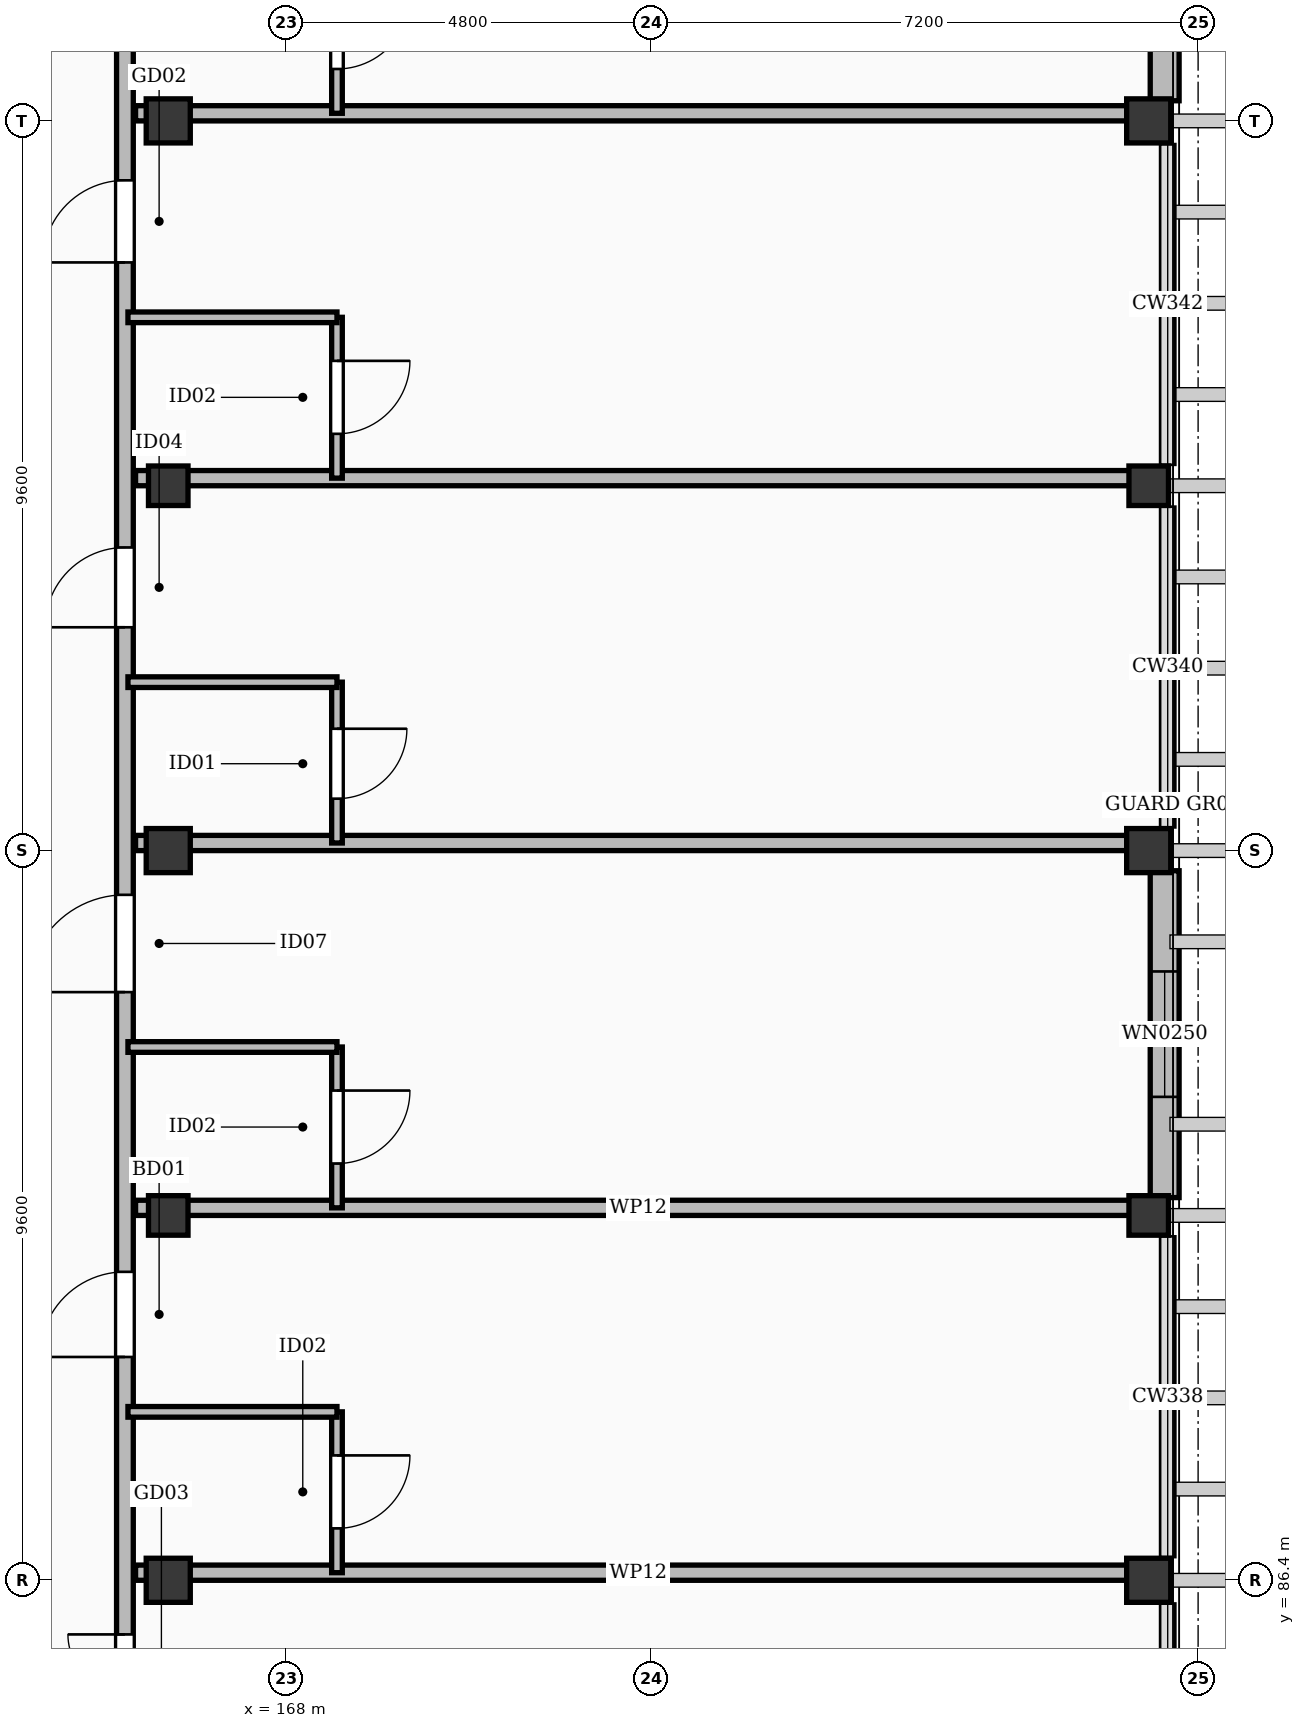
"""IFC4 building model, lengths in metres.
Left out: names, types, materials, properties, quantities, classifications, styles, units other than length and angle.
Written with IfcOpenShell. Run it as: python <this file> out.ifc"""

import sys

from ifc_helpers import new_model, si_unit, direction, frame, frame_2d, origin, origin_2d, place, context, subcontext, project, spatial, rectangle, extrude, element, fill, save


model = new_model("IFC4")
c1 = context("Model", 3, precision=1e-05, world=origin(), true_north=direction((0.0, 1.0)))
c2 = subcontext(c1, "Body", "Model", "MODEL_VIEW")
j1 = project(units=[si_unit("LENGTHUNIT", "METRE"), si_unit("PLANEANGLEUNIT", "RADIAN")], contexts=[c1])
p1 = place(None, origin())
s1 = spatial("IfcSite", under=j1, at=p1, CompositionType="ELEMENT")
p2 = place(p1, origin())
s2 = spatial("IfcBuilding", under=s1, at=p2, CompositionType="ELEMENT")
p3 = place(p2, frame((0.0, 0.0, 46.5)))
s3 = spatial("IfcBuildingStorey", under=s2, at=p3, CompositionType="ELEMENT", Elevation=46.5)
for number, where, z_axis, x_axis in (
    (1, (166.45, 86.4, 0.0), (0.0, 0.0, 1.0), (1.0, 0.0, 0.0)),
    (2, (166.45, 96.0, 0.0), (0.0, 0.0, 1.0), (1.0, 0.0, 0.0)),
    (3, (166.45, 105.6, 0.0), (0.0, 0.0, 1.0), (1.0, 0.0, 0.0)),
    (4, (179.35, 86.4, 0.0), (0.0, 0.0, 1.0), (1.0, 0.0, 0.0)),
    (5, (179.35, 96.0, 0.0), (0.0, 0.0, 1.0), (1.0, 0.0, 0.0)),
    (6, (179.35, 105.6, 0.0), (0.0, 0.0, 1.0), (1.0, 0.0, 0.0)),
):
    element("IfcColumn", number, at=place(p3, frame(where, z_axis=z_axis, x_axis=x_axis)), inside=s3, PredefinedType="COLUMN", context=c2, shape_type="SweptSolid", body=[
        extrude(rectangle(XDim=0.58, YDim=0.58, at=origin_2d()), origin(), (0.0, 0.0, 1.0), 3.9),
    ])
for number, where, z_axis, x_axis in (
    (7, (166.45, 91.2, 0.0), (0.0, 0.0, 1.0), (1.0, 0.0, 0.0)),
    (8, (166.45, 100.8, 0.0), (0.0, 0.0, 1.0), (1.0, 0.0, 0.0)),
    (9, (179.35, 91.2, 0.0), (0.0, 0.0, 1.0), (1.0, 0.0, 0.0)),
    (10, (179.35, 100.8, 0.0), (0.0, 0.0, 1.0), (1.0, 0.0, 0.0)),
):
    element("IfcColumn", number, at=place(p3, frame(where, z_axis=z_axis, x_axis=x_axis)), inside=s3, PredefinedType="COLUMN", context=c2, shape_type="SweptSolid", body=[
        extrude(rectangle(XDim=0.52, YDim=0.52, at=origin_2d()), origin(), (0.0, 0.0, 1.0), 3.9),
    ])
p4 = place(p3, frame((179.56, 95.735, 0.0), z_axis=(0.0, 0.0, 1.0), x_axis=(0.0, -1.0, 0.0)))
e11 = element("IfcWall", 11, at=p4, inside=s3, PredefinedType="SOLIDWALL", context=c2, shape_type="SweptSolid", body=[
    extrude(rectangle(XDim=4.3, YDim=0.38, at=frame_2d((2.15, 0.0))), origin(), (0.0, 0.0, 1.0), 3.072),
])
p5 = place(p4, frame((1.325, 0.0, 0.55)))
e12 = element("IfcOpeningElement", 12, at=p5, cuts=e11, PredefinedType="OPENING", context=c2, shape_type="SweptSolid", body=[
    extrude(rectangle(XDim=1.65, YDim=1.75, at=frame_2d((0.825, 0.875))), frame((0.0, 0.202, 0.0), z_axis=(0.0, -1.0, 0.0), x_axis=(1.0, 0.0, 0.0)), (0.0, 0.0, 1.0), 0.404),
])
p6 = place(p3, frame((179.56, 110.165, 0.0), z_axis=(0.0, 0.0, 1.0), x_axis=(0.0, -1.0, 0.0)))
e13 = element("IfcWall", 13, at=p6, inside=s3, PredefinedType="SOLIDWALL", context=c2, shape_type="SweptSolid", body=[
    extrude(rectangle(XDim=4.3, YDim=0.38, at=frame_2d((2.15, 0.0))), origin(), (0.0, 0.0, 1.0), 3.072),
])
p7 = place(p6, frame((1.1, 0.0, 0.55)))
e14 = element("IfcOpeningElement", 14, at=p7, cuts=e13, PredefinedType="OPENING", context=c2, shape_type="SweptSolid", body=[
    extrude(rectangle(XDim=2.1, YDim=1.78, at=frame_2d((1.05, 0.89))), frame((0.0, 0.202, 0.0), z_axis=(0.0, -1.0, 0.0), x_axis=(1.0, 0.0, 0.0)), (0.0, 0.0, 1.0), 0.404),
])
p8 = place(p3, frame((165.88, 67.55, 0.0), z_axis=(0.0, 0.0, 1.0), x_axis=(0.0, 1.0, 0.0)))
e15 = element("IfcWall", 15, at=p8, inside=s3, PredefinedType="PARTITIONING", context=c2, shape_type="SweptSolid", body=[
    extrude(rectangle(XDim=58.1, YDim=0.22, at=frame_2d((29.05, 0.0))), origin(), (0.0, 0.0, 1.0), 2.922),
])
p9 = place(p8, frame((5.15, 0.0, 0.0)))
e16 = element("IfcOpeningElement", 16, at=p9, cuts=e15, PredefinedType="OPENING", context=c2, shape_type="SweptSolid", body=[
    extrude(rectangle(XDim=1.28, YDim=2.16, at=frame_2d((0.64, 1.08))), frame((0.0, 0.122, 0.0), z_axis=(0.0, -1.0, 0.0), x_axis=(1.0, 0.0, 0.0)), (0.0, 0.0, 1.0), 0.244),
])
p10 = place(p8, frame((12.188, 0.0, 0.0)))
e17 = element("IfcOpeningElement", 17, at=p10, cuts=e15, PredefinedType="OPENING", context=c2, shape_type="SweptSolid", body=[
    extrude(rectangle(XDim=1.02, YDim=2.2, at=frame_2d((0.51, 1.1))), frame((0.0, 0.122, 0.0), z_axis=(0.0, -1.0, 0.0), x_axis=(1.0, 0.0, 0.0)), (0.0, 0.0, 1.0), 0.244),
])
p11 = place(p8, frame((16.638, 0.0, 0.0)))
e18 = element("IfcOpeningElement", 18, at=p11, cuts=e15, PredefinedType="OPENING", context=c2, shape_type="SweptSolid", body=[
    extrude(rectangle(XDim=1.5, YDim=2.3, at=frame_2d((0.75, 1.15))), frame((0.0, 0.122, 0.0), z_axis=(0.0, -1.0, 0.0), x_axis=(1.0, 0.0, 0.0)), (0.0, 0.0, 1.0), 0.244),
])
p12 = place(p8, frame((21.788, 0.0, 0.0)))
e19 = element("IfcOpeningElement", 19, at=p12, cuts=e15, PredefinedType="OPENING", context=c2, shape_type="SweptSolid", body=[
    extrude(rectangle(XDim=1.12, YDim=2.15, at=frame_2d((0.56, 1.075))), frame((0.0, 0.122, 0.0), z_axis=(0.0, -1.0, 0.0), x_axis=(1.0, 0.0, 0.0)), (0.0, 0.0, 1.0), 0.244),
])
p13 = place(p8, frame((26.588, 0.0, 0.0)))
e20 = element("IfcOpeningElement", 20, at=p13, cuts=e15, PredefinedType="OPENING", context=c2, shape_type="SweptSolid", body=[
    extrude(rectangle(XDim=1.28, YDim=2.16, at=frame_2d((0.64, 1.08))), frame((0.0, 0.122, 0.0), z_axis=(0.0, -1.0, 0.0), x_axis=(1.0, 0.0, 0.0)), (0.0, 0.0, 1.0), 0.244),
])
p14 = place(p8, frame((31.388, 0.0, 0.0)))
e21 = element("IfcOpeningElement", 21, at=p14, cuts=e15, PredefinedType="OPENING", context=c2, shape_type="SweptSolid", body=[
    extrude(rectangle(XDim=1.05, YDim=2.18, at=frame_2d((0.525, 1.09))), frame((0.0, 0.122, 0.0), z_axis=(0.0, -1.0, 0.0), x_axis=(1.0, 0.0, 0.0)), (0.0, 0.0, 1.0), 0.244),
])
p15 = place(p8, frame((36.188, 0.0, 0.0)))
e22 = element("IfcOpeningElement", 22, at=p15, cuts=e15, PredefinedType="OPENING", context=c2, shape_type="SweptSolid", body=[
    extrude(rectangle(XDim=1.08, YDim=2.25, at=frame_2d((0.54, 1.125))), frame((0.0, 0.122, 0.0), z_axis=(0.0, -1.0, 0.0), x_axis=(1.0, 0.0, 0.0)), (0.0, 0.0, 1.0), 0.244),
])
p16 = place(p8, frame((40.988, 0.0, 0.0)))
e23 = element("IfcOpeningElement", 23, at=p16, cuts=e15, PredefinedType="OPENING", context=c2, shape_type="SweptSolid", body=[
    extrude(rectangle(XDim=1.02, YDim=2.2, at=frame_2d((0.51, 1.1))), frame((0.0, 0.122, 0.0), z_axis=(0.0, -1.0, 0.0), x_axis=(1.0, 0.0, 0.0)), (0.0, 0.0, 1.0), 0.244),
])
p17 = place(p8, frame((45.438, 0.0, 0.0)))
e24 = element("IfcOpeningElement", 24, at=p17, cuts=e15, PredefinedType="OPENING", context=c2, shape_type="SweptSolid", body=[
    extrude(rectangle(XDim=1.5, YDim=2.3, at=frame_2d((0.75, 1.15))), frame((0.0, 0.122, 0.0), z_axis=(0.0, -1.0, 0.0), x_axis=(1.0, 0.0, 0.0)), (0.0, 0.0, 1.0), 0.244),
])
p18 = place(p8, frame((50.588, 0.0, 0.0)))
e25 = element("IfcOpeningElement", 25, at=p18, cuts=e15, PredefinedType="OPENING", context=c2, shape_type="SweptSolid", body=[
    extrude(rectangle(XDim=1.12, YDim=2.15, at=frame_2d((0.56, 1.075))), frame((0.0, 0.122, 0.0), z_axis=(0.0, -1.0, 0.0), x_axis=(1.0, 0.0, 0.0)), (0.0, 0.0, 1.0), 0.244),
])
p19 = place(p8, frame((55.388, 0.0, 0.0)))
e26 = element("IfcOpeningElement", 26, at=p19, cuts=e15, PredefinedType="OPENING", context=c2, shape_type="SweptSolid", body=[
    extrude(rectangle(XDim=1.28, YDim=2.16, at=frame_2d((0.64, 1.08))), frame((0.0, 0.122, 0.0), z_axis=(0.0, -1.0, 0.0), x_axis=(1.0, 0.0, 0.0)), (0.0, 0.0, 1.0), 0.244),
])
p20 = place(p3, frame((166.02, 86.5, 0.0), z_axis=(0.0, 0.0, 1.0), x_axis=(1.0, 0.0, 0.0)))
e27 = element("IfcWall", 27, at=p20, inside=s3, PredefinedType="PARTITIONING", context=c2, shape_type="SweptSolid", body=[
    extrude(rectangle(XDim=13.23, YDim=0.2, at=frame_2d((6.615, 0.0))), origin(), (0.0, 0.0, 1.0), 3.072),
])
p21 = place(p3, frame((168.67, 86.5, 0.0), z_axis=(0.0, 0.0, 1.0), x_axis=(0.0, 1.0, 0.0)))
e28 = element("IfcWall", 28, at=p21, inside=s3, PredefinedType="PARTITIONING", context=c2, shape_type="SweptSolid", body=[
    extrude(rectangle(XDim=2.116, YDim=0.14, at=frame_2d((1.058, 0.0))), origin(), (0.0, 0.0, 1.0), 3.072),
])
p22 = place(p21, frame((0.583, 0.0, 0.0)))
e29 = element("IfcOpeningElement", 29, at=p22, cuts=e28, PredefinedType="OPENING", context=c2, shape_type="SweptSolid", body=[
    extrude(rectangle(XDim=0.96, YDim=2.12, at=frame_2d((0.48, 1.06))), frame((0.0, 0.082, 0.0), z_axis=(0.0, -1.0, 0.0), x_axis=(1.0, 0.0, 0.0)), (0.0, 0.0, 1.0), 0.164),
])
p23 = place(p3, frame((165.92, 88.616, 0.0), z_axis=(0.0, 0.0, 1.0), x_axis=(1.0, 0.0, 0.0)))
e30 = element("IfcWall", 30, at=p23, inside=s3, PredefinedType="PARTITIONING", context=c2, shape_type="SweptSolid", body=[
    extrude(rectangle(XDim=2.75, YDim=0.14, at=frame_2d((1.375, 0.0))), origin(), (0.0, 0.0, 1.0), 3.072),
])
p24 = place(p3, frame((166.02, 91.3, 0.0), z_axis=(0.0, 0.0, 1.0), x_axis=(1.0, 0.0, 0.0)))
e31 = element("IfcWall", 31, at=p24, inside=s3, PredefinedType="PARTITIONING", context=c2, shape_type="SweptSolid", body=[
    extrude(rectangle(XDim=13.23, YDim=0.2, at=frame_2d((6.615, 0.0))), origin(), (0.0, 0.0, 1.0), 3.072),
])
p25 = place(p3, frame((168.67, 91.3, 0.0), z_axis=(0.0, 0.0, 1.0), x_axis=(0.0, 1.0, 0.0)))
e32 = element("IfcWall", 32, at=p25, inside=s3, PredefinedType="PARTITIONING", context=c2, shape_type="SweptSolid", body=[
    extrude(rectangle(XDim=2.116, YDim=0.14, at=frame_2d((1.058, 0.0))), origin(), (0.0, 0.0, 1.0), 3.072),
])
p26 = place(p25, frame((0.583, 0.0, 0.0)))
e33 = element("IfcOpeningElement", 33, at=p26, cuts=e32, PredefinedType="OPENING", context=c2, shape_type="SweptSolid", body=[
    extrude(rectangle(XDim=0.96, YDim=2.12, at=frame_2d((0.48, 1.06))), frame((0.0, 0.082, 0.0), z_axis=(0.0, -1.0, 0.0), x_axis=(1.0, 0.0, 0.0)), (0.0, 0.0, 1.0), 0.164),
])
p27 = place(p3, frame((165.92, 93.416, 0.0), z_axis=(0.0, 0.0, 1.0), x_axis=(1.0, 0.0, 0.0)))
e34 = element("IfcWall", 34, at=p27, inside=s3, PredefinedType="PARTITIONING", context=c2, shape_type="SweptSolid", body=[
    extrude(rectangle(XDim=2.75, YDim=0.14, at=frame_2d((1.375, 0.0))), origin(), (0.0, 0.0, 1.0), 3.072),
])
p28 = place(p3, frame((166.02, 96.1, 0.0), z_axis=(0.0, 0.0, 1.0), x_axis=(1.0, 0.0, 0.0)))
e35 = element("IfcWall", 35, at=p28, inside=s3, PredefinedType="PARTITIONING", context=c2, shape_type="SweptSolid", body=[
    extrude(rectangle(XDim=13.23, YDim=0.2, at=frame_2d((6.615, 0.0))), origin(), (0.0, 0.0, 1.0), 3.072),
])
p29 = place(p3, frame((168.67, 96.1, 0.0), z_axis=(0.0, 0.0, 1.0), x_axis=(0.0, 1.0, 0.0)))
e36 = element("IfcWall", 36, at=p29, inside=s3, PredefinedType="PARTITIONING", context=c2, shape_type="SweptSolid", body=[
    extrude(rectangle(XDim=2.116, YDim=0.14, at=frame_2d((1.058, 0.0))), origin(), (0.0, 0.0, 1.0), 3.072),
])
p30 = place(p29, frame((0.583, 0.0, 0.0)))
e37 = element("IfcOpeningElement", 37, at=p30, cuts=e36, PredefinedType="OPENING", context=c2, shape_type="SweptSolid", body=[
    extrude(rectangle(XDim=0.92, YDim=2.1, at=frame_2d((0.46, 1.05))), frame((0.0, 0.082, 0.0), z_axis=(0.0, -1.0, 0.0), x_axis=(1.0, 0.0, 0.0)), (0.0, 0.0, 1.0), 0.164),
])
p31 = place(p3, frame((165.92, 98.216, 0.0), z_axis=(0.0, 0.0, 1.0), x_axis=(1.0, 0.0, 0.0)))
e38 = element("IfcWall", 38, at=p31, inside=s3, PredefinedType="PARTITIONING", context=c2, shape_type="SweptSolid", body=[
    extrude(rectangle(XDim=2.75, YDim=0.14, at=frame_2d((1.375, 0.0))), origin(), (0.0, 0.0, 1.0), 3.072),
])
p32 = place(p3, frame((166.02, 100.9, 0.0), z_axis=(0.0, 0.0, 1.0), x_axis=(1.0, 0.0, 0.0)))
e39 = element("IfcWall", 39, at=p32, inside=s3, PredefinedType="PARTITIONING", context=c2, shape_type="SweptSolid", body=[
    extrude(rectangle(XDim=13.23, YDim=0.2, at=frame_2d((6.615, 0.0))), origin(), (0.0, 0.0, 1.0), 3.072),
])
p33 = place(p3, frame((168.67, 100.9, 0.0), z_axis=(0.0, 0.0, 1.0), x_axis=(0.0, 1.0, 0.0)))
e40 = element("IfcWall", 40, at=p33, inside=s3, PredefinedType="PARTITIONING", context=c2, shape_type="SweptSolid", body=[
    extrude(rectangle(XDim=2.116, YDim=0.14, at=frame_2d((1.058, 0.0))), origin(), (0.0, 0.0, 1.0), 3.072),
])
p34 = place(p33, frame((0.583, 0.0, 0.0)))
e41 = element("IfcOpeningElement", 41, at=p34, cuts=e40, PredefinedType="OPENING", context=c2, shape_type="SweptSolid", body=[
    extrude(rectangle(XDim=0.96, YDim=2.12, at=frame_2d((0.48, 1.06))), frame((0.0, 0.082, 0.0), z_axis=(0.0, -1.0, 0.0), x_axis=(1.0, 0.0, 0.0)), (0.0, 0.0, 1.0), 0.164),
])
p35 = place(p3, frame((165.92, 103.016, 0.0), z_axis=(0.0, 0.0, 1.0), x_axis=(1.0, 0.0, 0.0)))
e42 = element("IfcWall", 42, at=p35, inside=s3, PredefinedType="PARTITIONING", context=c2, shape_type="SweptSolid", body=[
    extrude(rectangle(XDim=2.75, YDim=0.14, at=frame_2d((1.375, 0.0))), origin(), (0.0, 0.0, 1.0), 3.072),
])
p36 = place(p3, frame((166.02, 105.7, 0.0), z_axis=(0.0, 0.0, 1.0), x_axis=(1.0, 0.0, 0.0)))
e43 = element("IfcWall", 43, at=p36, inside=s3, PredefinedType="PARTITIONING", context=c2, shape_type="SweptSolid", body=[
    extrude(rectangle(XDim=13.23, YDim=0.2, at=frame_2d((6.615, 0.0))), origin(), (0.0, 0.0, 1.0), 3.072),
])
p37 = place(p3, frame((168.67, 105.7, 0.0), z_axis=(0.0, 0.0, 1.0), x_axis=(0.0, 1.0, 0.0)))
e44 = element("IfcWall", 44, at=p37, inside=s3, PredefinedType="PARTITIONING", context=c2, shape_type="SweptSolid", body=[
    extrude(rectangle(XDim=2.116, YDim=0.14, at=frame_2d((1.058, 0.0))), origin(), (0.0, 0.0, 1.0), 3.072),
])
p38 = place(p37, frame((0.583, 0.0, 0.0)))
e45 = element("IfcOpeningElement", 45, at=p38, cuts=e44, PredefinedType="OPENING", context=c2, shape_type="SweptSolid", body=[
    extrude(rectangle(XDim=0.96, YDim=2.12, at=frame_2d((0.48, 1.06))), frame((0.0, 0.082, 0.0), z_axis=(0.0, -1.0, 0.0), x_axis=(1.0, 0.0, 0.0)), (0.0, 0.0, 1.0), 0.164),
])
p39 = place(p5, origin())
e46 = element("IfcWindow", 46, at=p39, inside=s3, PartitioningType="SINGLE_PANEL", PredefinedType="WINDOW", context=c2, shape_type="SweptSolid", body=[
    extrude(rectangle(XDim=1.65, YDim=1.75, at=frame_2d((0.825, 0.875))), frame((0.0, 0.03, 0.0), z_axis=(0.0, -1.0, 0.0), x_axis=(1.0, 0.0, 0.0)), (0.0, 0.0, 1.0), 0.06),
])
fill(e12, e46)
p40 = place(p11, origin())
e47 = element("IfcDoor", 47, at=p40, inside=s3, OperationType="DOUBLE_DOOR_SINGLE_SWING", PredefinedType="DOOR", context=c2, shape_type="SweptSolid", body=[
    extrude(rectangle(XDim=1.5, YDim=2.3, at=frame_2d((0.75, 1.15))), frame((0.0, 0.025, 0.0), z_axis=(0.0, -1.0, 0.0), x_axis=(1.0, 0.0, 0.0)), (0.0, 0.0, 1.0), 0.05),
])
fill(e18, e47)
p41 = place(p12, origin())
e48 = element("IfcDoor", 48, at=p41, inside=s3, OperationType="SINGLE_SWING_LEFT", PredefinedType="DOOR", context=c2, shape_type="SweptSolid", body=[
    extrude(rectangle(XDim=1.12, YDim=2.15, at=frame_2d((0.56, 1.075))), frame((0.0, 0.025, 0.0), z_axis=(0.0, -1.0, 0.0), x_axis=(1.0, 0.0, 0.0)), (0.0, 0.0, 1.0), 0.05),
])
fill(e19, e48)
p42 = place(p22, frame((0.96, 0.0, 0.0), z_axis=(0.0, 0.0, 1.0), x_axis=(-1.0, 0.0, 0.0)))
e49 = element("IfcDoor", 49, at=p42, inside=s3, OperationType="SINGLE_SWING_RIGHT", PredefinedType="DOOR", context=c2, shape_type="SweptSolid", body=[
    extrude(rectangle(XDim=0.96, YDim=2.12, at=frame_2d((0.48, 1.06))), frame((0.0, 0.025, 0.0), z_axis=(0.0, -1.0, 0.0), x_axis=(1.0, 0.0, 0.0)), (0.0, 0.0, 1.0), 0.05),
])
fill(e29, e49)
p43 = place(p13, origin())
e50 = element("IfcDoor", 50, at=p43, inside=s3, OperationType="SINGLE_SWING_LEFT", PredefinedType="DOOR", context=c2, shape_type="SweptSolid", body=[
    extrude(rectangle(XDim=1.28, YDim=2.16, at=frame_2d((0.64, 1.08))), frame((0.0, 0.025, 0.0), z_axis=(0.0, -1.0, 0.0), x_axis=(1.0, 0.0, 0.0)), (0.0, 0.0, 1.0), 0.05),
])
fill(e20, e50)
p44 = place(p26, frame((0.96, 0.0, 0.0), z_axis=(0.0, 0.0, 1.0), x_axis=(-1.0, 0.0, 0.0)))
e51 = element("IfcDoor", 51, at=p44, inside=s3, OperationType="SINGLE_SWING_RIGHT", PredefinedType="DOOR", context=c2, shape_type="SweptSolid", body=[
    extrude(rectangle(XDim=0.96, YDim=2.12, at=frame_2d((0.48, 1.06))), frame((0.0, 0.025, 0.0), z_axis=(0.0, -1.0, 0.0), x_axis=(1.0, 0.0, 0.0)), (0.0, 0.0, 1.0), 0.05),
])
fill(e33, e51)
p45 = place(p14, origin())
e52 = element("IfcDoor", 52, at=p45, inside=s3, OperationType="SINGLE_SWING_LEFT", PredefinedType="DOOR", context=c2, shape_type="SweptSolid", body=[
    extrude(rectangle(XDim=1.05, YDim=2.18, at=frame_2d((0.525, 1.09))), frame((0.0, 0.025, 0.0), z_axis=(0.0, -1.0, 0.0), x_axis=(1.0, 0.0, 0.0)), (0.0, 0.0, 1.0), 0.05),
])
fill(e21, e52)
p46 = place(p30, frame((0.92, 0.0, 0.0), z_axis=(0.0, 0.0, 1.0), x_axis=(-1.0, 0.0, 0.0)))
e53 = element("IfcDoor", 53, at=p46, inside=s3, OperationType="SINGLE_SWING_RIGHT", PredefinedType="DOOR", context=c2, shape_type="SweptSolid", body=[
    extrude(rectangle(XDim=0.92, YDim=2.1, at=frame_2d((0.46, 1.05))), frame((0.0, 0.025, 0.0), z_axis=(0.0, -1.0, 0.0), x_axis=(1.0, 0.0, 0.0)), (0.0, 0.0, 1.0), 0.05),
])
fill(e37, e53)
p47 = place(p15, origin())
e54 = element("IfcDoor", 54, at=p47, inside=s3, OperationType="SINGLE_SWING_LEFT", PredefinedType="DOOR", context=c2, shape_type="SweptSolid", body=[
    extrude(rectangle(XDim=1.08, YDim=2.25, at=frame_2d((0.54, 1.125))), frame((0.0, 0.025, 0.0), z_axis=(0.0, -1.0, 0.0), x_axis=(1.0, 0.0, 0.0)), (0.0, 0.0, 1.0), 0.05),
])
fill(e22, e54)
p48 = place(p34, frame((0.96, 0.0, 0.0), z_axis=(0.0, 0.0, 1.0), x_axis=(-1.0, 0.0, 0.0)))
e55 = element("IfcDoor", 55, at=p48, inside=s3, OperationType="SINGLE_SWING_RIGHT", PredefinedType="DOOR", context=c2, shape_type="SweptSolid", body=[
    extrude(rectangle(XDim=0.96, YDim=2.12, at=frame_2d((0.48, 1.06))), frame((0.0, 0.025, 0.0), z_axis=(0.0, -1.0, 0.0), x_axis=(1.0, 0.0, 0.0)), (0.0, 0.0, 1.0), 0.05),
])
fill(e41, e55)
p49 = place(p38, frame((0.96, 0.0, 0.0), z_axis=(0.0, 0.0, 1.0), x_axis=(-1.0, 0.0, 0.0)))
e56 = element("IfcDoor", 56, at=p49, inside=s3, OperationType="SINGLE_SWING_RIGHT", PredefinedType="DOOR", context=c2, shape_type="SweptSolid", body=[
    extrude(rectangle(XDim=0.96, YDim=2.12, at=frame_2d((0.48, 1.06))), frame((0.0, 0.025, 0.0), z_axis=(0.0, -1.0, 0.0), x_axis=(1.0, 0.0, 0.0)), (0.0, 0.0, 1.0), 0.05),
])
fill(e45, e56)
save(model, sys.argv[1])
